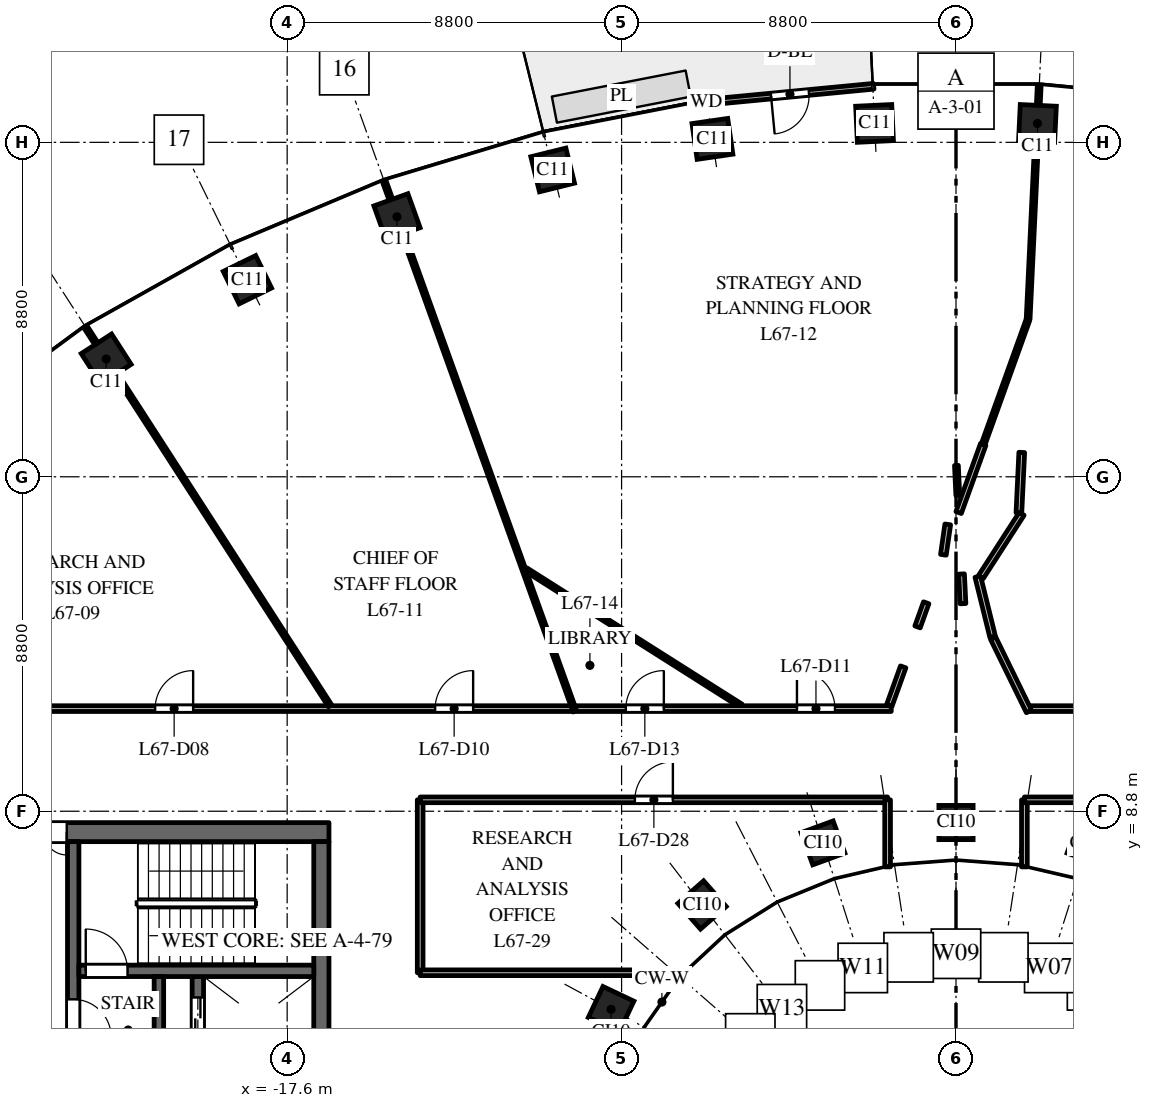
"""IFC4 building model, lengths in metres.
Left out: names, types, materials, properties, quantities, classifications, styles, units other than length and angle.
Written with IfcOpenShell. Run it as: python <this file> out.ifc"""

import sys

from ifc_helpers import new_model, si_unit, direction, frame, frame_2d, origin, origin_2d, place, context, subcontext, project, spatial, rectangle, extrude, element, fill, save


model = new_model("IFC4")
c1 = context("Model", 3, precision=1e-05, world=origin(), true_north=direction((0.0, 1.0)))
c2 = subcontext(c1, "Body", "Model", "MODEL_VIEW")
j1 = project(units=[si_unit("LENGTHUNIT", "METRE"), si_unit("PLANEANGLEUNIT", "RADIAN")], contexts=[c1])
p1 = place(None, origin())
s1 = spatial("IfcSite", under=j1, at=p1, CompositionType="ELEMENT")
p2 = place(p1, origin())
s2 = spatial("IfcBuilding", under=s1, at=p2, CompositionType="ELEMENT")
p3 = place(p2, frame((0.0, 0.0, 311.0)))
s3 = spatial("IfcBuildingStorey", under=s2, at=p3, CompositionType="ELEMENT", Elevation=311.0)
for number, where, z_axis, x_axis in (
    (1, (2.143, 26.898, 0.0), (0.0, 0.0, 1.0), (-0.999, 0.048, 0.0)),
    (2, (-2.143, 26.898, 0.0), (0.0, 0.0, 1.0), (-0.999, -0.048, 0.0)),
    (3, (-6.409, 26.491, 0.0), (0.0, 0.0, 1.0), (-0.99, -0.143, 0.0)),
    (4, (-10.613, 25.674, 0.0), (0.0, 0.0, 1.0), (-0.971, -0.24, 0.0)),
    (5, (-14.709, 24.441, 0.0), (0.0, 0.0, 1.0), (-0.941, -0.338, 0.0)),
    (6, (-18.646, 22.785, 0.0), (0.0, 0.0, 1.0), (-0.898, -0.439, 0.0)),
    (7, (-22.362, 20.7, 0.0), (0.0, 0.0, 1.0), (-0.84, -0.542, 0.0)),
):
    element("IfcColumn", number, at=place(p3, frame(where, z_axis=z_axis, x_axis=x_axis)), inside=s3, PredefinedType="COLUMN", context=c2, shape_type="SweptSolid", body=[
        extrude(rectangle(XDim=0.95, YDim=0.95, at=origin_2d()), origin(), (0.0, 0.0, 1.0), 4.0),
    ])
for number, where, z_axis, x_axis in (
    (8, (3.501, 7.967, 0.0), (0.0, 0.0, 1.0), (-0.939, 0.344, 0.0)),
    (9, (0.0, 8.503, 0.0), (0.0, 0.0, 1.0), (-1.0, 0.0, 0.0)),
    (10, (-3.501, 7.967, 0.0), (0.0, 0.0, 1.0), (-0.939, -0.344, 0.0)),
    (11, (-6.682, 6.334, 0.0), (0.0, 0.0, 1.0), (-0.751, -0.66, 0.0)),
    (12, (-9.076, 3.588, 0.0), (0.0, 0.0, 1.0), (-0.429, -0.903, 0.0)),
):
    element("IfcColumn", number, at=place(p3, frame(where, z_axis=z_axis, x_axis=x_axis)), inside=s3, PredefinedType="COLUMN", context=c2, shape_type="SweptSolid", body=[
        extrude(rectangle(XDim=0.9, YDim=0.9, at=origin_2d()), origin(), (0.0, 0.0, 1.0), 4.0),
    ])
p4 = place(p3, frame((-16.5, 8.25, 0.0), z_axis=(0.0, 0.0, 1.0), x_axis=(-1.0, 0.0, 0.0)))
e13 = element("IfcWall", 13, at=p4, inside=s3, PredefinedType="SHEAR", context=c2, shape_type="SweptSolid", body=[
    extrude(rectangle(XDim=15.0, YDim=0.5, at=frame_2d((7.5, 0.0))), origin(), (0.0, 0.0, 1.0), 3.7),
])
p5 = place(p4, frame((6.9, 0.0, 0.0)))
e14 = element("IfcOpeningElement", 14, at=p5, cuts=e13, PredefinedType="OPENING", context=c2, shape_type="SweptSolid", body=[
    extrude(rectangle(XDim=1.2, YDim=2.1, at=frame_2d((0.6, 1.05))), frame((0.0, 0.26, 0.0), z_axis=(0.0, -1.0, 0.0), x_axis=(1.0, 0.0, 0.0)), (0.0, 0.0, 1.0), 0.52),
])
p6 = place(p4, frame((12.05, 0.0, 0.0)))
e15 = element("IfcOpeningElement", 15, at=p6, cuts=e13, PredefinedType="OPENING", context=c2, shape_type="SweptSolid", body=[
    extrude(rectangle(XDim=0.9, YDim=2.1, at=frame_2d((0.45, 1.05))), frame((0.0, 0.26, 0.0), z_axis=(0.0, -1.0, 0.0), x_axis=(1.0, 0.0, 0.0)), (0.0, 0.0, 1.0), 0.52),
])
p7 = place(p3, frame((-19.95, -4.45, 0.0), z_axis=(0.0, 0.0, 1.0), x_axis=(0.0, 1.0, 0.0)))
e16 = element("IfcWall", 16, at=p7, inside=s3, PredefinedType="SHEAR", context=c2, shape_type="SweptSolid", body=[
    extrude(rectangle(XDim=8.9, YDim=0.3, at=frame_2d((4.45, 0.0))), origin(), (0.0, 0.0, 1.0), 3.7),
])
p8 = place(p7, frame((0.775, 0.0, 0.0)))
e17 = element("IfcOpeningElement", 17, at=p8, cuts=e16, PredefinedType="OPENING", context=c2, shape_type="SweptSolid", body=[
    extrude(rectangle(XDim=1.2, YDim=2.1, at=frame_2d((0.6, 1.05))), frame((0.0, 0.16, 0.0), z_axis=(0.0, -1.0, 0.0), x_axis=(1.0, 0.0, 0.0)), (0.0, 0.0, 1.0), 0.32),
])
p9 = place(p7, frame((7.25, 0.0, 0.0)))
e18 = element("IfcOpeningElement", 18, at=p9, cuts=e16, PredefinedType="OPENING", context=c2, shape_type="SweptSolid", body=[
    extrude(rectangle(XDim=1.1, YDim=2.1, at=frame_2d((0.55, 1.05))), frame((0.0, 0.16, 0.0), z_axis=(0.0, -1.0, 0.0), x_axis=(1.0, 0.0, 0.0)), (0.0, 0.0, 1.0), 0.32),
])
p10 = place(p3, frame((-16.7, -8.0, 0.0), z_axis=(0.0, 0.0, 1.0), x_axis=(0.0, 1.0, 0.0)))
e19 = element("IfcWall", 19, at=p10, inside=s3, PredefinedType="SHEAR", context=c2, shape_type="SweptSolid", body=[
    extrude(rectangle(XDim=16.0, YDim=0.4, at=frame_2d((8.0, 0.0))), origin(), (0.0, 0.0, 1.0), 3.7),
])
p11 = place(p3, frame((-23.23, 2.25, 0.0), z_axis=(0.0, 0.0, 1.0), x_axis=(0.0, 1.0, 0.0)))
e20 = element("IfcWall", 20, at=p11, inside=s3, PredefinedType="SHEAR", context=c2, shape_type="SweptSolid", body=[
    extrude(rectangle(XDim=5.75, YDim=0.3, at=frame_2d((2.875, 0.0))), origin(), (0.0, 0.0, 1.0), 3.7),
])
p12 = place(p11, frame((0.6, 0.0, 0.0)))
e21 = element("IfcOpeningElement", 21, at=p12, cuts=e20, PredefinedType="OPENING", context=c2, shape_type="SweptSolid", body=[
    extrude(rectangle(XDim=1.0, YDim=2.1, at=frame_2d((0.5, 1.05))), frame((0.0, 0.16, 0.0), z_axis=(0.0, -1.0, 0.0), x_axis=(1.0, 0.0, 0.0)), (0.0, 0.0, 1.0), 0.32),
])
p13 = place(p3, frame((-16.9, 4.6, 0.0), z_axis=(0.0, 0.0, 1.0), x_axis=(-1.0, 0.0, 0.0)))
e22 = element("IfcWall", 22, at=p13, inside=s3, PredefinedType="SHEAR", context=c2, shape_type="SweptSolid", body=[
    extrude(rectangle(XDim=6.18, YDim=0.3, at=frame_2d((3.09, 0.0))), origin(), (0.0, 0.0, 1.0), 3.7),
])
p14 = place(p13, frame((4.9, 0.0, 0.0)))
e23 = element("IfcOpeningElement", 23, at=p14, cuts=e22, PredefinedType="OPENING", context=c2, shape_type="SweptSolid", body=[
    extrude(rectangle(XDim=1.1, YDim=2.1, at=frame_2d((0.55, 1.05))), frame((0.0, 0.16, 0.0), z_axis=(0.0, -1.0, 0.0), x_axis=(1.0, 0.0, 0.0)), (0.0, 0.0, 1.0), 0.32),
])
p15 = place(p3, frame((-20.975, 2.25, 0.0), z_axis=(0.0, 0.0, 1.0), x_axis=(0.0, 1.0, 0.0)))
e24 = element("IfcWall", 24, at=p15, inside=s3, PredefinedType="SHEAR", context=c2, shape_type="SweptSolid", body=[
    extrude(rectangle(XDim=2.2, YDim=0.25, at=frame_2d((1.1, 0.0))), origin(), (0.0, 0.0, 1.0), 3.7),
])
p16 = place(p3, frame((-2.166, 27.875, 0.0), z_axis=(0.0, 0.0, 1.0), x_axis=(-0.995473879823, -0.095035543824, 0.0)))
e25 = element("IfcWall", 25, at=p16, inside=s3, PredefinedType="STANDARD", context=c2, shape_type="SweptSolid", body=[
    extrude(rectangle(XDim=4.426, YDim=0.15, at=frame_2d((2.213, 0.0))), origin(), (0.0, 0.0, 1.0), 3.7),
])
p17 = place(p16, frame((1.713, 0.0, 0.0)))
e26 = element("IfcOpeningElement", 26, at=p17, cuts=e25, PredefinedType="OPENING", context=c2, shape_type="SweptSolid", body=[
    extrude(rectangle(XDim=1.0, YDim=2.4, at=frame_2d((0.5, 1.2))), frame((0.0, 0.085, 0.0), z_axis=(0.0, -1.0, 0.0), x_axis=(1.0, 0.0, 0.0)), (0.0, 0.0, 1.0), 0.17),
])
p18 = place(p3, frame((-31.5, 11.5, 0.0), z_axis=(0.0, 0.0, 1.0), x_axis=(1.0, 0.0, 0.0)))
e27 = element("IfcWall", 27, at=p18, inside=s3, PredefinedType="PARTITIONING", context=c2, shape_type="SweptSolid", body=[
    extrude(rectangle(XDim=21.432, YDim=0.15, at=frame_2d((10.716, 0.0))), origin(), (0.0, 0.0, 1.0), 2.75),
])
p19 = place(p18, frame((2.999, 0.0, 0.0)))
e28 = element("IfcOpeningElement", 28, at=p19, cuts=e27, PredefinedType="OPENING", context=c2, shape_type="SweptSolid", body=[
    extrude(rectangle(XDim=1.0, YDim=2.1, at=frame_2d((0.5, 1.05))), frame((0.0, 0.085, 0.0), z_axis=(0.0, -1.0, 0.0), x_axis=(1.0, 0.0, 0.0)), (0.0, 0.0, 1.0), 0.17),
])
p20 = place(p18, frame((10.426, 0.0, 0.0)))
e29 = element("IfcOpeningElement", 29, at=p20, cuts=e27, PredefinedType="OPENING", context=c2, shape_type="SweptSolid", body=[
    extrude(rectangle(XDim=1.0, YDim=2.1, at=frame_2d((0.5, 1.05))), frame((0.0, 0.085, 0.0), z_axis=(0.0, -1.0, 0.0), x_axis=(1.0, 0.0, 0.0)), (0.0, 0.0, 1.0), 0.17),
])
p21 = place(p18, frame((17.794, 0.0, 0.0)))
e30 = element("IfcOpeningElement", 30, at=p21, cuts=e27, PredefinedType="OPENING", context=c2, shape_type="SweptSolid", body=[
    extrude(rectangle(XDim=1.0, YDim=2.1, at=frame_2d((0.5, 1.05))), frame((0.0, 0.085, 0.0), z_axis=(0.0, -1.0, 0.0), x_axis=(1.0, 0.0, 0.0)), (0.0, 0.0, 1.0), 0.17),
])
p22 = place(p3, frame((-22.905, 21.542, 0.0), z_axis=(0.0, 0.0, 1.0), x_axis=(0.54229092728, -0.840190782019, 0.0)))
e31 = element("IfcWall", 31, at=p22, inside=s3, PredefinedType="PARTITIONING", context=c2, shape_type="SweptSolid", body=[
    extrude(rectangle(XDim=11.863, YDim=0.1, at=frame_2d((5.931, 0.0))), origin(), (0.0, 0.0, 1.0), 2.75),
])
p23 = place(p3, frame((-15.048, 25.383, 0.0), z_axis=(0.0, 0.0, 1.0), x_axis=(0.338396469125, -0.941003628943, 0.0)))
e32 = element("IfcWall", 32, at=p23, inside=s3, PredefinedType="PARTITIONING", context=c2, shape_type="SweptSolid", body=[
    extrude(rectangle(XDim=14.829, YDim=0.1, at=frame_2d((7.415, 0.0))), origin(), (0.0, 0.0, 1.0), 2.75),
])
p24 = place(p3, frame((-14.1, 4.55, 0.0), z_axis=(0.0, 0.0, 1.0), x_axis=(0.0, 1.0, 0.0)))
e33 = element("IfcWall", 33, at=p24, inside=s3, PredefinedType="PARTITIONING", context=c2, shape_type="SweptSolid", body=[
    extrude(rectangle(XDim=4.55, YDim=0.15, at=frame_2d((2.275, 0.0))), origin(), (0.0, 0.0, 1.0), 3.7),
])
p25 = place(p3, frame((-14.1, 4.55, 0.0), z_axis=(0.0, 0.0, 1.0), x_axis=(1.0, 0.0, 0.0)))
e34 = element("IfcWall", 34, at=p25, inside=s3, PredefinedType="PARTITIONING", context=c2, shape_type="SweptSolid", body=[
    extrude(rectangle(XDim=6.966, YDim=0.15, at=frame_2d((3.483, 0.0))), origin(), (0.0, 0.0, 1.0), 3.0),
])
p26 = place(p3, frame((-14.1, 9.1, 0.0), z_axis=(0.0, 0.0, 1.0), x_axis=(1.0, 0.0, 0.0)))
e35 = element("IfcWall", 35, at=p26, inside=s3, PredefinedType="PARTITIONING", context=c2, shape_type="SweptSolid", body=[
    extrude(rectangle(XDim=12.3, YDim=0.15, at=frame_2d((6.15, 0.0))), origin(), (0.0, 0.0, 1.0), 2.75),
])
p27 = place(p26, frame((5.65, 0.0, 0.0)))
e36 = element("IfcOpeningElement", 36, at=p27, cuts=e35, PredefinedType="OPENING", context=c2, shape_type="SweptSolid", body=[
    extrude(rectangle(XDim=1.0, YDim=2.1, at=frame_2d((0.5, 1.05))), frame((0.0, 0.085, 0.0), z_axis=(0.0, -1.0, 0.0), x_axis=(1.0, 0.0, 0.0)), (0.0, 0.0, 1.0), 0.17),
])
p28 = place(p3, frame((-11.319, 15.161, 0.0), z_axis=(0.0, 0.0, 1.0), x_axis=(0.844865171483, -0.534979291203, 0.0)))
e37 = element("IfcWall", 37, at=p28, inside=s3, PredefinedType="PARTITIONING", context=c2, shape_type="SweptSolid", body=[
    extrude(rectangle(XDim=6.703, YDim=0.1, at=frame_2d((3.352, 0.0))), origin(), (0.0, 0.0, 1.0), 3.7),
])
p29 = place(p3, frame((-10.003, 11.5, 0.0), z_axis=(0.0, 0.0, 1.0), x_axis=(1.0, 0.0, 0.0)))
e38 = element("IfcWall", 38, at=p29, inside=s3, PredefinedType="PARTITIONING", context=c2, shape_type="SweptSolid", body=[
    extrude(rectangle(XDim=8.298, YDim=0.15, at=frame_2d((4.149, 0.0))), origin(), (0.0, 0.0, 1.0), 2.75),
])
p30 = place(p29, frame((5.818, 0.0, 0.0)))
e39 = element("IfcOpeningElement", 39, at=p30, cuts=e38, PredefinedType="OPENING", context=c2, shape_type="SweptSolid", body=[
    extrude(rectangle(XDim=1.0, YDim=2.1, at=frame_2d((0.5, 1.05))), frame((0.0, 0.085, 0.0), z_axis=(0.0, -1.0, 0.0), x_axis=(1.0, 0.0, 0.0)), (0.0, 0.0, 1.0), 0.17),
])
p31 = place(p29, frame((1.315, 0.0, 0.0)))
e40 = element("IfcOpeningElement", 40, at=p31, cuts=e38, PredefinedType="OPENING", context=c2, shape_type="SweptSolid", body=[
    extrude(rectangle(XDim=1.0, YDim=2.1, at=frame_2d((0.5, 1.05))), frame((0.0, 0.085, 0.0), z_axis=(0.0, -1.0, 0.0), x_axis=(1.0, 0.0, 0.0)), (0.0, 0.0, 1.0), 0.17),
])
p32 = place(p3, frame((-1.8, 7.336, 0.0), z_axis=(0.0, 0.0, 1.0), x_axis=(0.0, 1.0, 0.0)))
e41 = element("IfcWall", 41, at=p32, inside=s3, PredefinedType="PARTITIONING", context=c2, shape_type="SweptSolid", body=[
    extrude(rectangle(XDim=1.764, YDim=0.15, at=frame_2d((0.882, 0.0))), origin(), (0.0, 0.0, 1.0), 3.0),
])
p33 = place(p3, frame((-1.757, 11.579, 0.0), z_axis=(0.0, 0.0, 1.0), x_axis=(0.339062715819, 0.940763772018, 0.0)))
e42 = element("IfcWall", 42, at=p33, inside=s3, PredefinedType="PARTITIONING", context=c2, shape_type="SweptSolid", body=[
    extrude(rectangle(XDim=1.083, YDim=0.15, at=frame_2d((0.542, 0.0))), origin(), (0.0, 0.0, 1.0), 3.7),
])
p34 = place(p3, frame((-1.012, 13.65, 0.0), z_axis=(0.0, 0.0, 1.0), x_axis=(0.33796337932, 0.941159260826, 0.0)))
e43 = element("IfcWall", 43, at=p34, inside=s3, PredefinedType="PARTITIONING", context=c2, shape_type="SweptSolid", body=[
    extrude(rectangle(XDim=0.675, YDim=0.15, at=frame_2d((0.337, 0.0))), origin(), (0.0, 0.0, 1.0), 2.85),
])
p35 = place(p3, frame((-0.332, 15.548, 0.0), z_axis=(0.0, 0.0, 1.0), x_axis=(0.14248004426, 0.989797674774, 0.0)))
e44 = element("IfcWall", 44, at=p35, inside=s3, PredefinedType="PARTITIONING", context=c2, shape_type="SweptSolid", body=[
    extrude(rectangle(XDim=0.807, YDim=0.15, at=frame_2d((0.404, 0.0))), origin(), (0.0, 0.0, 1.0), 3.7),
])
p36 = place(p3, frame((0.011, 17.899, 0.0), z_axis=(0.0, 0.0, 1.0), x_axis=(0.046862039633, -0.998901371128, 0.0)))
e45 = element("IfcWall", 45, at=p36, inside=s3, PredefinedType="PARTITIONING", context=c2, shape_type="SweptSolid", body=[
    extrude(rectangle(XDim=0.792, YDim=0.1, at=frame_2d((0.396, 0.0))), origin(), (0.0, 0.0, 1.0), 3.7),
])
p37 = place(p3, frame((0.069, 16.659, 0.0), z_axis=(0.0, 0.0, 1.0), x_axis=(0.339417840218, 0.940635705117, 0.0)))
e46 = element("IfcWall", 46, at=p37, inside=s3, PredefinedType="PARTITIONING", context=c2, shape_type="SweptSolid", body=[
    extrude(rectangle(XDim=1.906, YDim=0.15, at=frame_2d((0.953, 0.0))), origin(), (0.0, 0.0, 1.0), 3.7),
])
p38 = place(p3, frame((0.146, 15.042, 0.0), z_axis=(0.0, 0.0, 1.0), x_axis=(0.048768193835, -0.998810123732, 0.0)))
e47 = element("IfcWall", 47, at=p38, inside=s3, PredefinedType="PARTITIONING", context=c2, shape_type="SweptSolid", body=[
    extrude(rectangle(XDim=0.781, YDim=0.15, at=frame_2d((0.391, 0.0))), origin(), (0.0, 0.0, 1.0), 3.7),
])
p39 = place(p3, frame((0.573, 14.974, 0.0), z_axis=(0.0, 0.0, 1.0), x_axis=(0.239690117004, -0.970849446521, 0.0)))
e48 = element("IfcWall", 48, at=p39, inside=s3, PredefinedType="PARTITIONING", context=c2, shape_type="SweptSolid", body=[
    extrude(rectangle(XDim=1.636, YDim=0.15, at=frame_2d((0.818, 0.0))), origin(), (0.0, 0.0, 1.0), 3.7),
])
p40 = place(p3, frame((0.654, 14.961, 0.0), z_axis=(0.0, 0.0, 1.0), x_axis=(0.542163330295, 0.840273124218, 0.0)))
e49 = element("IfcWall", 49, at=p40, inside=s3, PredefinedType="PARTITIONING", context=c2, shape_type="SweptSolid", body=[
    extrude(rectangle(XDim=1.983, YDim=0.15, at=frame_2d((0.991, 0.0))), origin(), (0.0, 0.0, 1.0), 3.7),
])
p41 = place(p3, frame((0.714, 18.452, 0.0), z_axis=(0.0, 0.0, 1.0), x_axis=(0.338365217831, 0.941014866706, 0.0)))
e50 = element("IfcWall", 50, at=p41, inside=s3, PredefinedType="PARTITIONING", context=c2, shape_type="SweptSolid", body=[
    extrude(rectangle(XDim=3.49, YDim=0.1, at=frame_2d((1.745, 0.0))), origin(), (0.0, 0.0, 1.0), 3.7),
])
p42 = place(p3, frame((0.977, 13.353, 0.0), z_axis=(0.0, 0.0, 1.0), x_axis=(0.439324382849, -0.898328495949, 0.0)))
e51 = element("IfcWall", 51, at=p42, inside=s3, PredefinedType="PARTITIONING", context=c2, shape_type="SweptSolid", body=[
    extrude(rectangle(XDim=2.146, YDim=0.15, at=frame_2d((1.073, 0.0))), origin(), (0.0, 0.0, 1.0), 3.7),
])
p43 = place(p3, frame((1.655, 16.65, 0.0), z_axis=(0.0, 0.0, 1.0), x_axis=(0.047055382931, 0.998892281949, 0.0)))
e52 = element("IfcWall", 52, at=p43, inside=s3, PredefinedType="PARTITIONING", context=c2, shape_type="SweptSolid", body=[
    extrude(rectangle(XDim=1.593, YDim=0.15, at=frame_2d((0.796, 0.0))), origin(), (0.0, 0.0, 1.0), 3.7),
])
p44 = place(p3, frame((1.8, 7.336, 0.0), z_axis=(0.0, 0.0, 1.0), x_axis=(0.0, 1.0, 0.0)))
e53 = element("IfcWall", 53, at=p44, inside=s3, PredefinedType="PARTITIONING", context=c2, shape_type="SweptSolid", body=[
    extrude(rectangle(XDim=1.764, YDim=0.15, at=frame_2d((0.882, 0.0))), origin(), (0.0, 0.0, 1.0), 3.0),
])
p45 = place(p3, frame((1.8, 9.1, 0.0), z_axis=(0.0, 0.0, 1.0), x_axis=(1.0, 0.0, 0.0)))
e54 = element("IfcWall", 54, at=p45, inside=s3, PredefinedType="PARTITIONING", context=c2, shape_type="SweptSolid", body=[
    extrude(rectangle(XDim=12.3, YDim=0.15, at=frame_2d((6.15, 0.0))), origin(), (0.0, 0.0, 1.0), 2.85),
])
p46 = place(p45, frame((5.65, 0.0, 0.0)))
e55 = element("IfcOpeningElement", 55, at=p46, cuts=e54, PredefinedType="OPENING", context=c2, shape_type="SweptSolid", body=[
    extrude(rectangle(XDim=1.0, YDim=2.1, at=frame_2d((0.5, 1.05))), frame((0.0, 0.085, 0.0), z_axis=(0.0, -1.0, 0.0), x_axis=(1.0, 0.0, 0.0)), (0.0, 0.0, 1.0), 0.17),
])
p47 = place(p3, frame((1.966, 11.5, 0.0), z_axis=(0.0, 0.0, 1.0), x_axis=(1.0, 0.0, 0.0)))
e56 = element("IfcWall", 56, at=p47, inside=s3, PredefinedType="PARTITIONING", context=c2, shape_type="SweptSolid", body=[
    extrude(rectangle(XDim=5.146, YDim=0.15, at=frame_2d((2.573, 0.0))), origin(), (0.0, 0.0, 1.0), 2.85),
])
p48 = place(p47, frame((2.013, 0.0, 0.0)))
e57 = element("IfcOpeningElement", 57, at=p48, cuts=e56, PredefinedType="OPENING", context=c2, shape_type="SweptSolid", body=[
    extrude(rectangle(XDim=1.0, YDim=2.1, at=frame_2d((0.5, 1.05))), frame((0.0, 0.085, 0.0), z_axis=(0.0, -1.0, 0.0), x_axis=(1.0, 0.0, 0.0)), (0.0, 0.0, 1.0), 0.17),
])
p49 = place(p3, frame((1.898, 21.75, 0.0), z_axis=(0.0, 0.0, 1.0), x_axis=(0.047440765919, 0.998874052986, 0.0)))
e58 = element("IfcWall", 58, at=p49, inside=s3, PredefinedType="PARTITIONING", context=c2, shape_type="SweptSolid", body=[
    extrude(rectangle(XDim=6.155, YDim=0.1, at=frame_2d((3.077, 0.0))), origin(), (0.0, 0.0, 1.0), 3.0),
])
p50 = place(p9, origin())
e59 = element("IfcDoor", 59, at=p50, inside=s3, OperationType="DOUBLE_DOOR_SLIDING", PredefinedType="DOOR", context=c2, shape_type="SweptSolid", body=[
    extrude(rectangle(XDim=1.1, YDim=2.1, at=frame_2d((0.55, 1.05))), frame((0.0, 0.025, 0.0), z_axis=(0.0, -1.0, 0.0), x_axis=(1.0, 0.0, 0.0)), (0.0, 0.0, 1.0), 0.05),
])
fill(e18, e59)
p51 = place(p14, origin())
e60 = element("IfcDoor", 60, at=p51, inside=s3, OperationType="SINGLE_SWING_RIGHT", PredefinedType="DOOR", context=c2, shape_type="SweptSolid", body=[
    extrude(rectangle(XDim=1.1, YDim=2.1, at=frame_2d((0.55, 1.05))), frame((0.0, 0.025, 0.0), z_axis=(0.0, -1.0, 0.0), x_axis=(1.0, 0.0, 0.0)), (0.0, 0.0, 1.0), 0.05),
])
fill(e23, e60)
p52 = place(p12, origin())
e61 = element("IfcDoor", 61, at=p52, inside=s3, OperationType="SINGLE_SWING_LEFT", PredefinedType="DOOR", context=c2, shape_type="SweptSolid", body=[
    extrude(rectangle(XDim=1.0, YDim=2.1, at=frame_2d((0.5, 1.05))), frame((0.0, 0.025, 0.0), z_axis=(0.0, -1.0, 0.0), x_axis=(1.0, 0.0, 0.0)), (0.0, 0.0, 1.0), 0.05),
])
fill(e21, e61)
p53 = place(p5, origin())
e62 = element("IfcDoor", 62, at=p53, inside=s3, OperationType="DOUBLE_DOOR_DOUBLE_SWING", PredefinedType="DOOR", context=c2, shape_type="SweptSolid", body=[
    extrude(rectangle(XDim=1.2, YDim=2.1, at=frame_2d((0.6, 1.05))), frame((0.0, 0.025, 0.0), z_axis=(0.0, -1.0, 0.0), x_axis=(1.0, 0.0, 0.0)), (0.0, 0.0, 1.0), 0.05),
])
fill(e14, e62)
p54 = place(p17, origin())
e63 = element("IfcDoor", 63, at=p54, inside=s3, OperationType="SINGLE_SWING_RIGHT", PredefinedType="DOOR", context=c2, shape_type="SweptSolid", body=[
    extrude(rectangle(XDim=1.0, YDim=2.4, at=frame_2d((0.5, 1.2))), frame((0.0, 0.025, 0.0), z_axis=(0.0, -1.0, 0.0), x_axis=(1.0, 0.0, 0.0)), (0.0, 0.0, 1.0), 0.05),
])
fill(e26, e63)
p55 = place(p20, origin())
e64 = element("IfcDoor", 64, at=p55, inside=s3, OperationType="SINGLE_SWING_RIGHT", PredefinedType="DOOR", context=c2, shape_type="SweptSolid", body=[
    extrude(rectangle(XDim=1.0, YDim=2.1, at=frame_2d((0.5, 1.05))), frame((0.0, 0.025, 0.0), z_axis=(0.0, -1.0, 0.0), x_axis=(1.0, 0.0, 0.0)), (0.0, 0.0, 1.0), 0.05),
])
fill(e29, e64)
p56 = place(p21, origin())
e65 = element("IfcDoor", 65, at=p56, inside=s3, OperationType="SINGLE_SWING_RIGHT", PredefinedType="DOOR", context=c2, shape_type="SweptSolid", body=[
    extrude(rectangle(XDim=1.0, YDim=2.1, at=frame_2d((0.5, 1.05))), frame((0.0, 0.025, 0.0), z_axis=(0.0, -1.0, 0.0), x_axis=(1.0, 0.0, 0.0)), (0.0, 0.0, 1.0), 0.05),
])
fill(e30, e65)
p57 = place(p30, origin())
e66 = element("IfcDoor", 66, at=p57, inside=s3, OperationType="SINGLE_SWING_LEFT", PredefinedType="DOOR", context=c2, shape_type="SweptSolid", body=[
    extrude(rectangle(XDim=1.0, YDim=2.1, at=frame_2d((0.5, 1.05))), frame((0.0, 0.025, 0.0), z_axis=(0.0, -1.0, 0.0), x_axis=(1.0, 0.0, 0.0)), (0.0, 0.0, 1.0), 0.05),
])
fill(e39, e66)
p58 = place(p31, origin())
e67 = element("IfcDoor", 67, at=p58, inside=s3, OperationType="SINGLE_SWING_RIGHT", PredefinedType="DOOR", context=c2, shape_type="SweptSolid", body=[
    extrude(rectangle(XDim=1.0, YDim=2.1, at=frame_2d((0.5, 1.05))), frame((0.0, 0.025, 0.0), z_axis=(0.0, -1.0, 0.0), x_axis=(1.0, 0.0, 0.0)), (0.0, 0.0, 1.0), 0.05),
])
fill(e40, e67)
p59 = place(p27, origin())
e68 = element("IfcDoor", 68, at=p59, inside=s3, OperationType="SINGLE_SWING_RIGHT", PredefinedType="DOOR", context=c2, shape_type="SweptSolid", body=[
    extrude(rectangle(XDim=1.0, YDim=2.1, at=frame_2d((0.5, 1.05))), frame((0.0, 0.025, 0.0), z_axis=(0.0, -1.0, 0.0), x_axis=(1.0, 0.0, 0.0)), (0.0, 0.0, 1.0), 0.05),
])
fill(e36, e68)
save(model, sys.argv[1])
